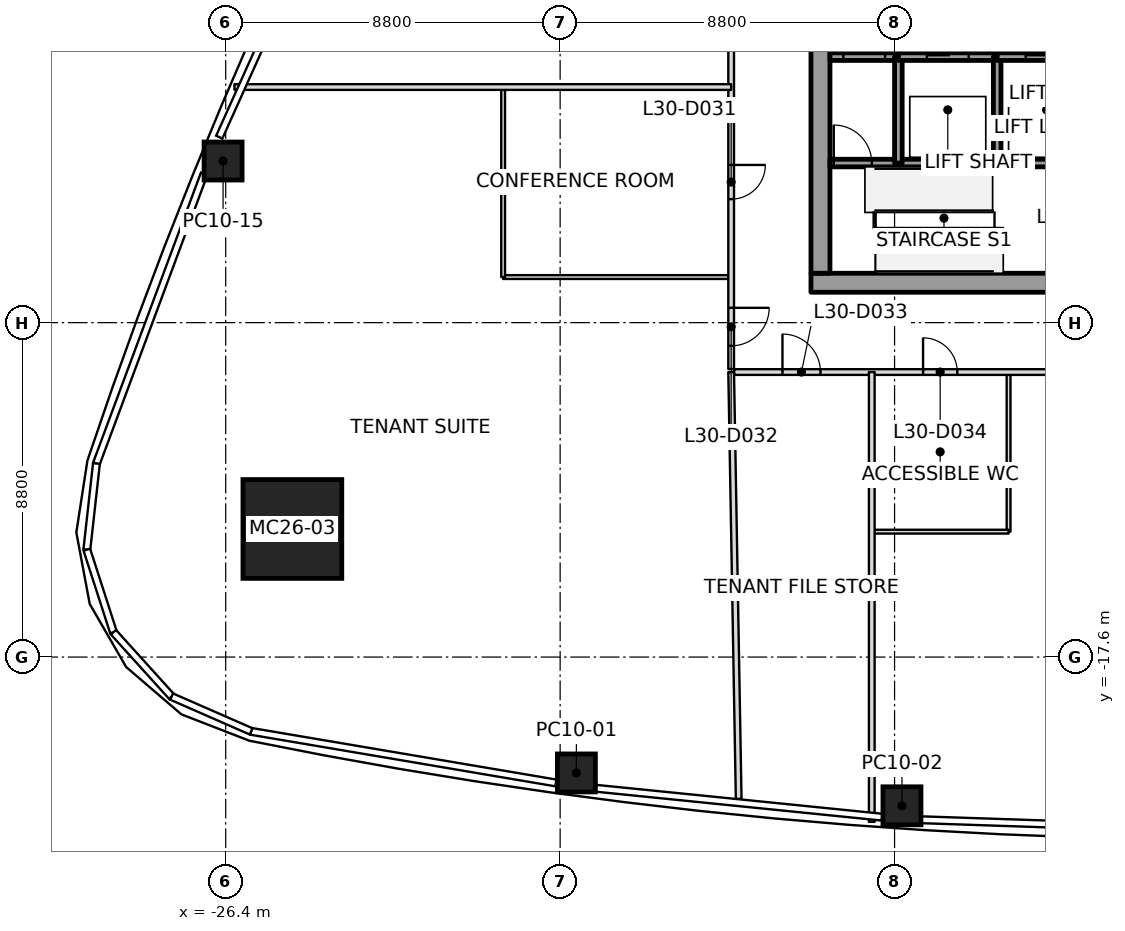
"""IFC4 building model, lengths in metres.
Left out: names, types, materials, properties, quantities, classifications, styles, units other than length and angle.
Written with IfcOpenShell. Run it as: python <this file> out.ifc"""

import sys

from ifc_helpers import new_model, si_unit, direction, frame, frame_2d, origin, origin_2d, place, context, subcontext, project, spatial, rectangle, extrude, element, fill, save


model = new_model("IFC4")
c1 = context("Model", 3, precision=1e-05, world=origin(), true_north=direction((0.0, 1.0)))
c2 = subcontext(c1, "Body", "Model", "MODEL_VIEW")
j1 = project(units=[si_unit("LENGTHUNIT", "METRE"), si_unit("PLANEANGLEUNIT", "RADIAN")], contexts=[c1])
p1 = place(None, origin())
s1 = spatial("IfcSite", under=j1, at=p1, CompositionType="ELEMENT")
p2 = place(p1, origin())
s2 = spatial("IfcBuilding", under=s1, at=p2, CompositionType="ELEMENT")
p3 = place(p2, frame((0.0, 0.0, 141.8)))
s3 = spatial("IfcBuildingStorey", under=s2, at=p3, CompositionType="ELEMENT", Elevation=141.8)
p4 = place(p3, frame((-24.646, -14.229, 0.0), z_axis=(0.028122372328, 0.016226791842, 0.999472772716), x_axis=(0.999604487872, -0.00045651644, -0.02811866672)))
e1 = element("IfcColumn", 1, at=p4, inside=s3, PredefinedType="COLUMN", context=c2, shape_type="SweptSolid", body=[
    extrude(rectangle(XDim=2.6, YDim=2.6, at=origin_2d()), origin(), (0.0, 0.0, 1.0), 4.002),
])
p5 = place(p3, frame((-17.173, -20.649, 0.0), z_axis=(0.017696448434, 0.010495824588, 0.999788314284), x_axis=(-0.990860954976, 0.1339190387, 0.016132544085)))
e2 = element("IfcColumn", 2, at=p5, inside=s3, PredefinedType="COLUMN", context=c2, shape_type="SweptSolid", body=[
    extrude(rectangle(XDim=1.0, YDim=1.0, at=origin_2d()), origin(), (0.0, 0.0, 1.0), 4.001),
])
p6 = place(p3, frame((-8.606, -21.514, 0.0), z_axis=(0.008910223283, 0.011168293567, 0.999897933361), x_axis=(-0.997711841726, 0.067117835077, 0.008141074528)))
e3 = element("IfcColumn", 3, at=p6, inside=s3, PredefinedType="COLUMN", context=c2, shape_type="SweptSolid", body=[
    extrude(rectangle(XDim=1.0, YDim=1.0, at=origin_2d()), origin(), (0.0, 0.0, 1.0), 4.0),
])
p7 = place(p3, frame((-26.469, -4.547, 0.0), z_axis=(0.017879535448, 0.010068680372, 0.999789449778), x_axis=(0.379623141119, 0.925001037033, -0.016104415983)))
e4 = element("IfcColumn", 4, at=p7, inside=s3, PredefinedType="COLUMN", context=c2, shape_type="SweptSolid", body=[
    extrude(rectangle(XDim=1.0, YDim=1.0, at=origin_2d()), origin(), (0.0, 0.0, 1.0), 4.001),
])
p8 = place(p3, frame((-11.0, -7.75, 0.0), z_axis=(0.0, 0.0, 1.0), x_axis=(1.0, 0.0, 0.0)))
e5 = element("IfcWall", 5, at=p8, inside=s3, PredefinedType="SHEAR", context=c2, shape_type="SweptSolid", body=[
    extrude(rectangle(XDim=22.0, YDim=0.5, at=frame_2d((11.0, 0.0))), origin(), (0.0, 0.0, 1.0), 4.0),
])
p9 = place(p8, frame((10.45, 0.0, 0.0)))
e6 = element("IfcOpeningElement", 6, at=p9, cuts=e5, PredefinedType="OPENING", context=c2, shape_type="SweptSolid", body=[
    extrude(rectangle(XDim=1.1, YDim=2.1, at=frame_2d((0.55, 1.05))), frame((0.0, 0.25, 0.0), z_axis=(0.0, -1.0, 0.0), x_axis=(1.0, 0.0, 0.0)), (0.0, 0.0, 1.0), 0.5),
])
p10 = place(p3, frame((-10.75, -7.5, 0.0), z_axis=(0.0, 0.0, 1.0), x_axis=(0.0, 1.0, 0.0)))
e7 = element("IfcWall", 7, at=p10, inside=s3, PredefinedType="SHEAR", context=c2, shape_type="SweptSolid", body=[
    extrude(rectangle(XDim=15.0, YDim=0.5, at=frame_2d((7.5, 0.0))), origin(), (0.0, 0.0, 1.0), 4.0),
])
p11 = place(p10, frame((6.6, 0.0, 0.0)))
e8 = element("IfcOpeningElement", 8, at=p11, cuts=e7, PredefinedType="OPENING", context=c2, shape_type="SweptSolid", body=[
    extrude(rectangle(XDim=1.8, YDim=2.1, at=frame_2d((0.9, 1.05))), frame((0.0, 0.25, 0.0), z_axis=(0.0, -1.0, 0.0), x_axis=(1.0, 0.0, 0.0)), (0.0, 0.0, 1.0), 0.5),
])
p12 = place(p3, frame((-10.5, -4.6, 0.0), z_axis=(0.0, 0.0, 1.0), x_axis=(1.0, 0.0, 0.0)))
e9 = element("IfcWall", 9, at=p12, inside=s3, PredefinedType="SOLIDWALL", context=c2, shape_type="SweptSolid", body=[
    extrude(rectangle(XDim=1.8, YDim=0.2, at=frame_2d((0.9, 0.0))), origin(), (0.0, 0.0, 1.0), 3.85),
])
p13 = place(p12, frame((0.1, 0.0, 0.0)))
e10 = element("IfcOpeningElement", 10, at=p13, cuts=e9, PredefinedType="OPENING", context=c2, shape_type="SweptSolid", body=[
    extrude(rectangle(XDim=1.0, YDim=2.1, at=frame_2d((0.5, 1.05))), frame((0.0, 0.1, 0.0), z_axis=(0.0, -1.0, 0.0), x_axis=(1.0, 0.0, 0.0)), (0.0, 0.0, 1.0), 0.2),
])
p14 = place(p3, frame((-10.5, -1.8, 0.0), z_axis=(0.0, 0.0, 1.0), x_axis=(1.0, 0.0, 0.0)))
e11 = element("IfcWall", 11, at=p14, inside=s3, PredefinedType="SOLIDWALL", context=c2, shape_type="SweptSolid", body=[
    extrude(rectangle(XDim=1.8, YDim=0.2, at=frame_2d((0.9, 0.0))), origin(), (0.0, 0.0, 1.0), 3.85),
])
p15 = place(p14, frame((0.35, 0.0, 0.0)))
e12 = element("IfcOpeningElement", 12, at=p15, cuts=e11, PredefinedType="OPENING", context=c2, shape_type="SweptSolid", body=[
    extrude(rectangle(XDim=1.1, YDim=2.1, at=frame_2d((0.55, 1.05))), frame((0.0, 0.1, 0.0), z_axis=(0.0, -1.0, 0.0), x_axis=(1.0, 0.0, 0.0)), (0.0, 0.0, 1.0), 0.2),
])
p16 = place(p3, frame((-8.7, -4.6, 0.0), z_axis=(0.0, 0.0, 1.0), x_axis=(1.0, 0.0, 0.0)))
e13 = element("IfcWall", 13, at=p16, inside=s3, PredefinedType="SOLIDWALL", context=c2, shape_type="SweptSolid", body=[
    extrude(rectangle(XDim=2.6, YDim=0.2, at=frame_2d((1.3, 0.0))), origin(), (0.0, 0.0, 1.0), 3.85),
])
p17 = place(p3, frame((-8.7, -4.6, 0.0), z_axis=(0.0, 0.0, 1.0), x_axis=(0.0, 1.0, 0.0)))
e14 = element("IfcWall", 14, at=p17, inside=s3, PredefinedType="SOLIDWALL", context=c2, shape_type="SweptSolid", body=[
    extrude(rectangle(XDim=2.8, YDim=0.2, at=frame_2d((1.4, 0.0))), origin(), (0.0, 0.0, 1.0), 3.85),
])
p18 = place(p3, frame((-8.7, -1.8, 0.0), z_axis=(0.0, 0.0, 1.0), x_axis=(1.0, 0.0, 0.0)))
e15 = element("IfcWall", 15, at=p18, inside=s3, PredefinedType="SOLIDWALL", context=c2, shape_type="SweptSolid", body=[
    extrude(rectangle(XDim=2.6, YDim=0.2, at=frame_2d((1.3, 0.0))), origin(), (0.0, 0.0, 1.0), 3.85),
])
p19 = place(p18, frame((0.75, 0.0, 0.0)))
e16 = element("IfcOpeningElement", 16, at=p19, cuts=e15, PredefinedType="OPENING", context=c2, shape_type="SweptSolid", body=[
    extrude(rectangle(XDim=1.1, YDim=2.1, at=frame_2d((0.55, 1.05))), frame((0.0, 0.1, 0.0), z_axis=(0.0, -1.0, 0.0), x_axis=(1.0, 0.0, 0.0)), (0.0, 0.0, 1.0), 0.2),
])
p20 = place(p3, frame((-6.1, -4.6, 0.0), z_axis=(0.0, 0.0, 1.0), x_axis=(1.0, 0.0, 0.0)))
e17 = element("IfcWall", 17, at=p20, inside=s3, PredefinedType="SOLIDWALL", context=c2, shape_type="SweptSolid", body=[
    extrude(rectangle(XDim=1.6, YDim=0.2, at=frame_2d((0.8, 0.0))), origin(), (0.0, 0.0, 1.0), 3.85),
])
p21 = place(p3, frame((-6.1, -4.6, 0.0), z_axis=(0.0, 0.0, 1.0), x_axis=(0.0, 1.0, 0.0)))
e18 = element("IfcWall", 18, at=p21, inside=s3, PredefinedType="SOLIDWALL", context=c2, shape_type="SweptSolid", body=[
    extrude(rectangle(XDim=2.8, YDim=0.2, at=frame_2d((1.4, 0.0))), origin(), (0.0, 0.0, 1.0), 3.85),
])
p22 = place(p3, frame((-6.1, -1.8, 0.0), z_axis=(0.0, 0.0, 1.0), x_axis=(1.0, 0.0, 0.0)))
e19 = element("IfcWall", 19, at=p22, inside=s3, PredefinedType="SOLIDWALL", context=c2, shape_type="SweptSolid", body=[
    extrude(rectangle(XDim=2.6, YDim=0.2, at=frame_2d((1.3, 0.0))), origin(), (0.0, 0.0, 1.0), 3.85),
])
p23 = place(p22, frame((0.75, 0.0, 0.0)))
e20 = element("IfcOpeningElement", 20, at=p23, cuts=e19, PredefinedType="OPENING", context=c2, shape_type="SweptSolid", body=[
    extrude(rectangle(XDim=1.1, YDim=2.1, at=frame_2d((0.55, 1.05))), frame((0.0, 0.1, 0.0), z_axis=(0.0, -1.0, 0.0), x_axis=(1.0, 0.0, 0.0)), (0.0, 0.0, 1.0), 0.2),
])
p24 = place(p3, frame((-13.1, -2.6, 0.0), z_axis=(0.0, 0.0, 1.0), x_axis=(-1.0, 0.0, 0.0)))
e21 = element("IfcWall", 21, at=p24, inside=s3, PredefinedType="PARTITIONING", context=c2, shape_type="SweptSolid", body=[
    extrude(rectangle(XDim=13.07, YDim=0.15, at=frame_2d((6.535, 0.0))), origin(), (0.0, 0.0, 1.0), 3.234),
])
p25 = place(p3, frame((-13.1, -10.1, 0.0), z_axis=(0.0, 0.0, 1.0), x_axis=(0.017647123272, -0.999844277395, 0.0)))
e22 = element("IfcWall", 22, at=p25, inside=s3, PredefinedType="PARTITIONING", context=c2, shape_type="SweptSolid", body=[
    extrude(rectangle(XDim=11.234, YDim=0.15, at=frame_2d((5.617, 0.0))), origin(), (0.0, 0.0, 1.0), 3.234),
])
p26 = place(p3, frame((-9.4, -10.1, 0.0), z_axis=(0.0, 0.0, 1.0), x_axis=(0.0, -1.0, 0.0)))
e23 = element("IfcWall", 23, at=p26, inside=s3, PredefinedType="PARTITIONING", context=c2, shape_type="SweptSolid", body=[
    extrude(rectangle(XDim=11.836, YDim=0.15, at=frame_2d((5.918, 0.0))), origin(), (0.0, 0.0, 1.0), 3.234),
])
p27 = place(p3, frame((-13.1, 10.02, 0.0), z_axis=(0.0, 0.0, 1.0), x_axis=(0.0, -1.0, 0.0)))
e24 = element("IfcWall", 24, at=p27, inside=s3, PredefinedType="PARTITIONING", context=c2, shape_type="SweptSolid", body=[
    extrude(rectangle(XDim=20.04, YDim=0.15, at=frame_2d((10.02, 0.0))), origin(), (0.0, 0.0, 1.0), 3.166),
])
p28 = place(p27, frame((1.57, 0.0, 0.0)))
e25 = element("IfcOpeningElement", 25, at=p28, cuts=e24, PredefinedType="OPENING", context=c2, shape_type="SweptSolid", body=[
    extrude(rectangle(XDim=0.9, YDim=2.1, at=frame_2d((0.45, 1.05))), frame((0.0, 0.075, 0.0), z_axis=(0.0, -1.0, 0.0), x_axis=(1.0, 0.0, 0.0)), (0.0, 0.0, 1.0), 0.15),
])
p29 = place(p27, frame((7.92, 0.0, 0.0)))
e26 = element("IfcOpeningElement", 26, at=p29, cuts=e24, PredefinedType="OPENING", context=c2, shape_type="SweptSolid", body=[
    extrude(rectangle(XDim=1.0, YDim=2.1, at=frame_2d((0.5, 1.05))), frame((0.0, 0.075, 0.0), z_axis=(0.0, -1.0, 0.0), x_axis=(1.0, 0.0, 0.0)), (0.0, 0.0, 1.0), 0.15),
])
p30 = place(p27, frame((14.67, 0.0, 0.0)))
e27 = element("IfcOpeningElement", 27, at=p30, cuts=e24, PredefinedType="OPENING", context=c2, shape_type="SweptSolid", body=[
    extrude(rectangle(XDim=0.9, YDim=2.1, at=frame_2d((0.45, 1.05))), frame((0.0, 0.075, 0.0), z_axis=(0.0, -1.0, 0.0), x_axis=(1.0, 0.0, 0.0)), (0.0, 0.0, 1.0), 0.15),
])
p31 = place(p27, frame((18.43, 0.0, 0.0)))
e28 = element("IfcOpeningElement", 28, at=p31, cuts=e24, PredefinedType="OPENING", context=c2, shape_type="SweptSolid", body=[
    extrude(rectangle(XDim=1.0, YDim=2.1, at=frame_2d((0.5, 1.05))), frame((0.0, 0.075, 0.0), z_axis=(0.0, -1.0, 0.0), x_axis=(1.0, 0.0, 0.0)), (0.0, 0.0, 1.0), 0.15),
])
p32 = place(p3, frame((-13.02, -10.1, 0.0), z_axis=(0.0, 0.0, 1.0), x_axis=(1.0, 0.0, 0.0)))
e29 = element("IfcWall", 29, at=p32, inside=s3, PredefinedType="PARTITIONING", context=c2, shape_type="SweptSolid", body=[
    extrude(rectangle(XDim=26.04, YDim=0.15, at=frame_2d((13.02, 0.0))), origin(), (0.0, 0.0, 1.0), 3.317),
])
p33 = place(p32, frame((1.27, 0.0, 0.0)))
e30 = element("IfcOpeningElement", 30, at=p33, cuts=e29, PredefinedType="OPENING", context=c2, shape_type="SweptSolid", body=[
    extrude(rectangle(XDim=1.0, YDim=2.1, at=frame_2d((0.5, 1.05))), frame((0.0, 0.075, 0.0), z_axis=(0.0, -1.0, 0.0), x_axis=(1.0, 0.0, 0.0)), (0.0, 0.0, 1.0), 0.15),
])
p34 = place(p32, frame((4.97, 0.0, 0.0)))
e31 = element("IfcOpeningElement", 31, at=p34, cuts=e29, PredefinedType="OPENING", context=c2, shape_type="SweptSolid", body=[
    extrude(rectangle(XDim=0.9, YDim=2.1, at=frame_2d((0.45, 1.05))), frame((0.0, 0.075, 0.0), z_axis=(0.0, -1.0, 0.0), x_axis=(1.0, 0.0, 0.0)), (0.0, 0.0, 1.0), 0.15),
])
p35 = place(p32, frame((12.47, 0.0, 0.0)))
e32 = element("IfcOpeningElement", 32, at=p35, cuts=e29, PredefinedType="OPENING", context=c2, shape_type="SweptSolid", body=[
    extrude(rectangle(XDim=1.0, YDim=2.1, at=frame_2d((0.5, 1.05))), frame((0.0, 0.075, 0.0), z_axis=(0.0, -1.0, 0.0), x_axis=(1.0, 0.0, 0.0)), (0.0, 0.0, 1.0), 0.15),
])
p36 = place(p32, frame((21.87, 0.0, 0.0)))
e33 = element("IfcOpeningElement", 33, at=p36, cuts=e29, PredefinedType="OPENING", context=c2, shape_type="SweptSolid", body=[
    extrude(rectangle(XDim=1.0, YDim=2.1, at=frame_2d((0.5, 1.05))), frame((0.0, 0.075, 0.0), z_axis=(0.0, -1.0, 0.0), x_axis=(1.0, 0.0, 0.0)), (0.0, 0.0, 1.0), 0.15),
])
p37 = place(p3, frame((-13.13, -7.6, 0.0), z_axis=(0.0, 0.0, 1.0), x_axis=(-1.0, 0.0, 0.0)))
e34 = element("IfcWall", 34, at=p37, inside=s3, PredefinedType="PARTITIONING", context=c2, shape_type="SweptSolid", body=[
    extrude(rectangle(XDim=5.97, YDim=0.1, at=frame_2d((2.985, 0.0))), origin(), (0.0, 0.0, 1.0), 3.247),
])
p38 = place(p3, frame((-19.1, -7.6, 0.0), z_axis=(0.0, 0.0, 1.0), x_axis=(0.0, 1.0, 0.0)))
e35 = element("IfcWall", 35, at=p38, inside=s3, PredefinedType="PARTITIONING", context=c2, shape_type="SweptSolid", body=[
    extrude(rectangle(XDim=4.97, YDim=0.1, at=frame_2d((2.485, 0.0))), origin(), (0.0, 0.0, 1.0), 3.247),
])
p39 = place(p3, frame((-5.8, -10.13, 0.0), z_axis=(0.0, 0.0, 1.0), x_axis=(0.0, -1.0, 0.0)))
e36 = element("IfcWall", 36, at=p39, inside=s3, PredefinedType="PARTITIONING", context=c2, shape_type="SweptSolid", body=[
    extrude(rectangle(XDim=4.17, YDim=0.1, at=frame_2d((2.085, 0.0))), origin(), (0.0, 0.0, 1.0), 3.45),
])
p40 = place(p3, frame((-5.8, -14.3, 0.0), z_axis=(0.0, 0.0, 1.0), x_axis=(-1.0, 0.0, 0.0)))
e37 = element("IfcWall", 37, at=p40, inside=s3, PredefinedType="PARTITIONING", context=c2, shape_type="SweptSolid", body=[
    extrude(rectangle(XDim=3.57, YDim=0.1, at=frame_2d((1.785, 0.0))), origin(), (0.0, 0.0, 1.0), 3.317),
])
p41 = place(p30, origin())
e38 = element("IfcDoor", 38, at=p41, inside=s3, OperationType="SINGLE_SWING_RIGHT", PredefinedType="DOOR", context=c2, shape_type="SweptSolid", body=[
    extrude(rectangle(XDim=0.9, YDim=2.1, at=frame_2d((0.45, 1.05))), frame((0.0, 0.025, 0.0), z_axis=(0.0, -1.0, 0.0), x_axis=(1.0, 0.0, 0.0)), (0.0, 0.0, 1.0), 0.05),
])
fill(e27, e38)
p42 = place(p31, origin())
e39 = element("IfcDoor", 39, at=p42, inside=s3, OperationType="SINGLE_SWING_RIGHT", PredefinedType="DOOR", context=c2, shape_type="SweptSolid", body=[
    extrude(rectangle(XDim=1.0, YDim=2.1, at=frame_2d((0.5, 1.05))), frame((0.0, 0.025, 0.0), z_axis=(0.0, -1.0, 0.0), x_axis=(1.0, 0.0, 0.0)), (0.0, 0.0, 1.0), 0.05),
])
fill(e28, e39)
p43 = place(p33, origin())
e40 = element("IfcDoor", 40, at=p43, inside=s3, OperationType="SINGLE_SWING_RIGHT", PredefinedType="DOOR", context=c2, shape_type="SweptSolid", body=[
    extrude(rectangle(XDim=1.0, YDim=2.1, at=frame_2d((0.5, 1.05))), frame((0.0, 0.025, 0.0), z_axis=(0.0, -1.0, 0.0), x_axis=(1.0, 0.0, 0.0)), (0.0, 0.0, 1.0), 0.05),
])
fill(e30, e40)
p44 = place(p34, origin())
e41 = element("IfcDoor", 41, at=p44, inside=s3, OperationType="SINGLE_SWING_RIGHT", PredefinedType="DOOR", context=c2, shape_type="SweptSolid", body=[
    extrude(rectangle(XDim=0.9, YDim=2.1, at=frame_2d((0.45, 1.05))), frame((0.0, 0.025, 0.0), z_axis=(0.0, -1.0, 0.0), x_axis=(1.0, 0.0, 0.0)), (0.0, 0.0, 1.0), 0.05),
])
fill(e31, e41)
p45 = place(p19, origin())
e42 = element("IfcDoor", 42, at=p45, inside=s3, OperationType="SLIDING_TO_RIGHT", PredefinedType="DOOR", context=c2, shape_type="SweptSolid", body=[
    extrude(rectangle(XDim=1.1, YDim=2.1, at=frame_2d((0.55, 1.05))), frame((0.0, 0.025, 0.0), z_axis=(0.0, -1.0, 0.0), x_axis=(1.0, 0.0, 0.0)), (0.0, 0.0, 1.0), 0.05),
])
fill(e16, e42)
p46 = place(p23, origin())
e43 = element("IfcDoor", 43, at=p46, inside=s3, OperationType="SLIDING_TO_RIGHT", PredefinedType="DOOR", context=c2, shape_type="SweptSolid", body=[
    extrude(rectangle(XDim=1.1, YDim=2.1, at=frame_2d((0.55, 1.05))), frame((0.0, 0.025, 0.0), z_axis=(0.0, -1.0, 0.0), x_axis=(1.0, 0.0, 0.0)), (0.0, 0.0, 1.0), 0.05),
])
fill(e20, e43)
p47 = place(p15, origin())
e44 = element("IfcDoor", 44, at=p47, inside=s3, OperationType="SINGLE_SWING_LEFT", PredefinedType="DOOR", context=c2, shape_type="SweptSolid", body=[
    extrude(rectangle(XDim=1.1, YDim=2.1, at=frame_2d((0.55, 1.05))), frame((0.0, 0.025, 0.0), z_axis=(0.0, -1.0, 0.0), x_axis=(1.0, 0.0, 0.0)), (0.0, 0.0, 1.0), 0.05),
])
fill(e12, e44)
p48 = place(p13, origin())
e45 = element("IfcDoor", 45, at=p48, inside=s3, OperationType="SINGLE_SWING_LEFT", PredefinedType="DOOR", context=c2, shape_type="SweptSolid", body=[
    extrude(rectangle(XDim=1.0, YDim=2.1, at=frame_2d((0.5, 1.05))), frame((0.0, 0.025, 0.0), z_axis=(0.0, -1.0, 0.0), x_axis=(1.0, 0.0, 0.0)), (0.0, 0.0, 1.0), 0.05),
])
fill(e10, e45)
save(model, sys.argv[1])
